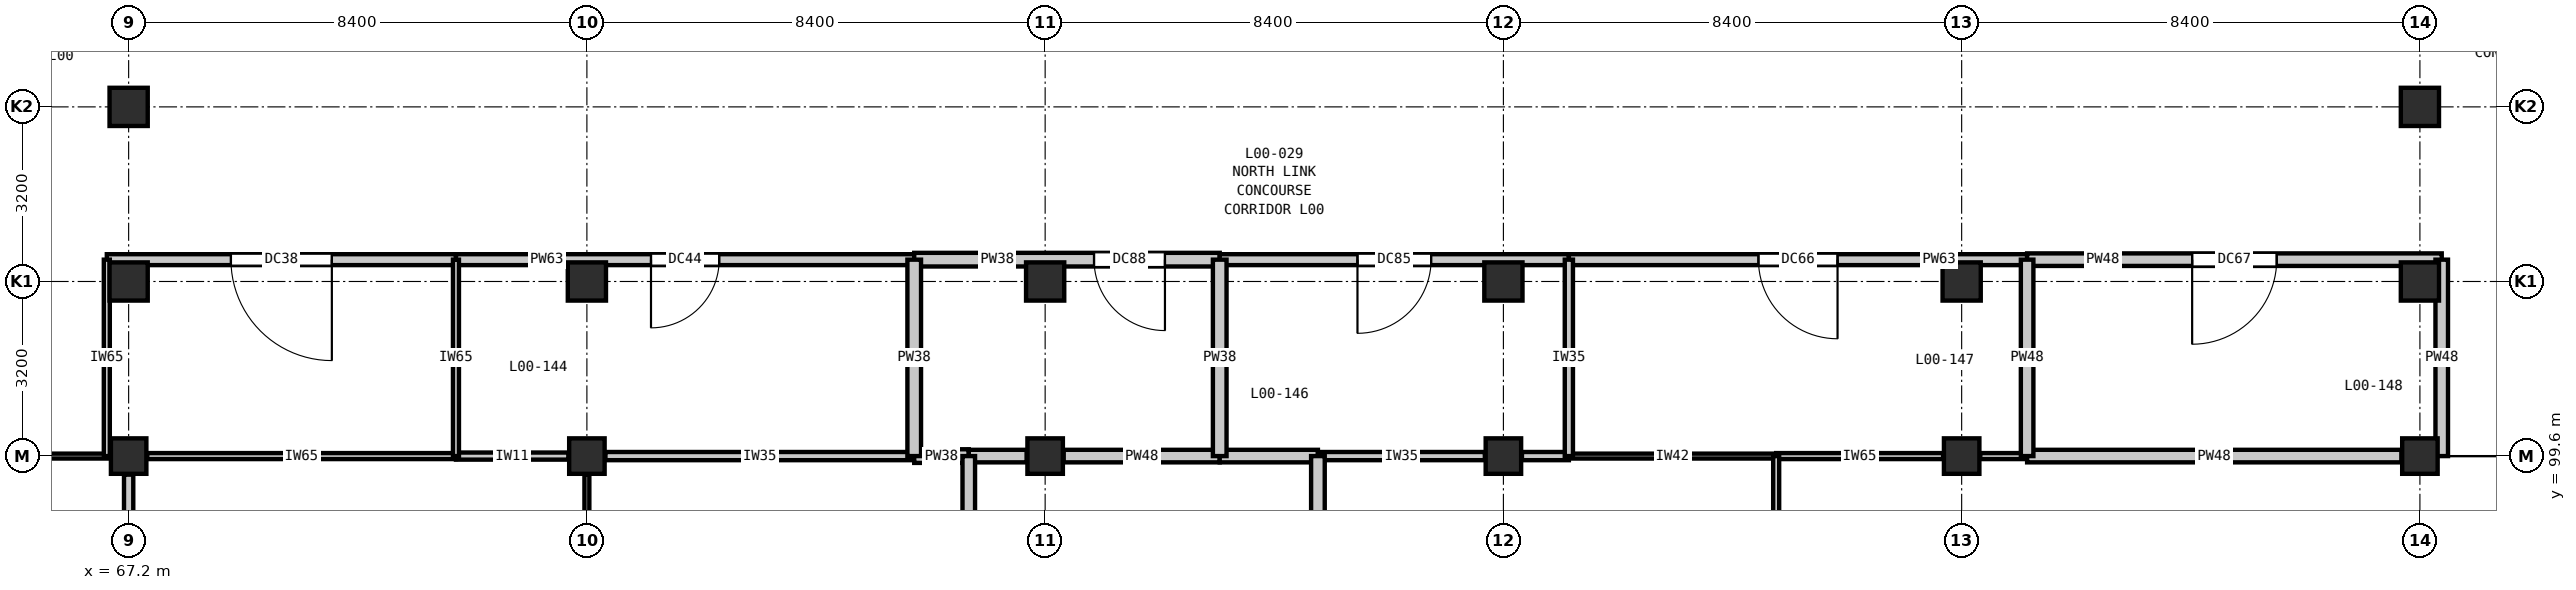
"""IFC4 building model, lengths in metres.
Left out: names, types, materials, properties, quantities, classifications, styles, units other than length and angle.
Written with IfcOpenShell. Run it as: python <this file> out.ifc"""

import sys

from ifc_helpers import new_model, si_unit, direction, frame, frame_2d, origin, origin_2d, place, context, subcontext, project, spatial, rectangle, extrude, element, fill, save


model = new_model("IFC4")
c1 = context("Model", 3, precision=1e-05, world=origin(), true_north=direction((0.0, 1.0)))
c2 = subcontext(c1, "Body", "Model", "MODEL_VIEW")
j1 = project(units=[si_unit("LENGTHUNIT", "METRE"), si_unit("PLANEANGLEUNIT", "RADIAN")], contexts=[c1])
p1 = place(None, origin())
s1 = spatial("IfcSite", under=j1, at=p1, CompositionType="ELEMENT")
p2 = place(p1, origin())
s2 = spatial("IfcBuilding", under=s1, at=p2, CompositionType="ELEMENT")
p3 = place(p2, origin())
s3 = spatial("IfcBuildingStorey", under=s2, at=p3, CompositionType="ELEMENT", Elevation=0.0)
p4 = place(p3, frame((67.2, 99.6, 0.0), z_axis=(0.0, 0.0, 1.0), x_axis=(1.0, 0.0, 0.0)))
e1 = element("IfcColumn", 1, at=p4, inside=s3, PredefinedType="COLUMN", context=c2, shape_type="SweptSolid", body=[
    extrude(rectangle(XDim=0.65, YDim=0.65, at=origin_2d()), origin(), (0.0, 0.0, 1.0), 5.4),
])
for number, where, z_axis, x_axis in (
    (2, (67.2, 102.8, 0.0), (0.0, 0.0, 1.0), (1.0, 0.0, 0.0)),
    (3, (67.2, 106.0, 0.0), (0.0, 0.0, 1.0), (1.0, 0.0, 0.0)),
):
    element("IfcColumn", number, at=place(p3, frame(where, z_axis=z_axis, x_axis=x_axis)), inside=s3, PredefinedType="COLUMN", context=c2, shape_type="SweptSolid", body=[
        extrude(rectangle(XDim=0.7, YDim=0.7, at=origin_2d()), origin(), (0.0, 0.0, 1.0), 5.4),
    ])
p5 = place(p3, frame((75.6, 99.6, 0.0), z_axis=(0.0, 0.0, 1.0), x_axis=(1.0, 0.0, 0.0)))
e4 = element("IfcColumn", 4, at=p5, inside=s3, PredefinedType="COLUMN", context=c2, shape_type="SweptSolid", body=[
    extrude(rectangle(XDim=0.65, YDim=0.65, at=origin_2d()), origin(), (0.0, 0.0, 1.0), 5.4),
])
p6 = place(p3, frame((75.6, 102.8, 0.0), z_axis=(0.0, 0.0, 1.0), x_axis=(1.0, 0.0, 0.0)))
e5 = element("IfcColumn", 5, at=p6, inside=s3, PredefinedType="COLUMN", context=c2, shape_type="SweptSolid", body=[
    extrude(rectangle(XDim=0.7, YDim=0.7, at=origin_2d()), origin(), (0.0, 0.0, 1.0), 5.4),
])
p7 = place(p3, frame((84.0, 99.6, 0.0), z_axis=(0.0, 0.0, 1.0), x_axis=(1.0, 0.0, 0.0)))
e6 = element("IfcColumn", 6, at=p7, inside=s3, PredefinedType="COLUMN", context=c2, shape_type="SweptSolid", body=[
    extrude(rectangle(XDim=0.65, YDim=0.65, at=origin_2d()), origin(), (0.0, 0.0, 1.0), 5.4),
])
p8 = place(p3, frame((84.0, 102.8, 0.0), z_axis=(0.0, 0.0, 1.0), x_axis=(1.0, 0.0, 0.0)))
e7 = element("IfcColumn", 7, at=p8, inside=s3, PredefinedType="COLUMN", context=c2, shape_type="SweptSolid", body=[
    extrude(rectangle(XDim=0.7, YDim=0.7, at=origin_2d()), origin(), (0.0, 0.0, 1.0), 5.4),
])
p9 = place(p3, frame((92.4, 99.6, 0.0), z_axis=(0.0, 0.0, 1.0), x_axis=(1.0, 0.0, 0.0)))
e8 = element("IfcColumn", 8, at=p9, inside=s3, PredefinedType="COLUMN", context=c2, shape_type="SweptSolid", body=[
    extrude(rectangle(XDim=0.65, YDim=0.65, at=origin_2d()), origin(), (0.0, 0.0, 1.0), 5.4),
])
p10 = place(p3, frame((92.4, 102.8, 0.0), z_axis=(0.0, 0.0, 1.0), x_axis=(1.0, 0.0, 0.0)))
e9 = element("IfcColumn", 9, at=p10, inside=s3, PredefinedType="COLUMN", context=c2, shape_type="SweptSolid", body=[
    extrude(rectangle(XDim=0.7, YDim=0.7, at=origin_2d()), origin(), (0.0, 0.0, 1.0), 5.4),
])
p11 = place(p3, frame((100.8, 99.6, 0.0), z_axis=(0.0, 0.0, 1.0), x_axis=(1.0, 0.0, 0.0)))
e10 = element("IfcColumn", 10, at=p11, inside=s3, PredefinedType="COLUMN", context=c2, shape_type="SweptSolid", body=[
    extrude(rectangle(XDim=0.65, YDim=0.65, at=origin_2d()), origin(), (0.0, 0.0, 1.0), 5.4),
])
p12 = place(p3, frame((100.8, 102.8, 0.0), z_axis=(0.0, 0.0, 1.0), x_axis=(1.0, 0.0, 0.0)))
e11 = element("IfcColumn", 11, at=p12, inside=s3, PredefinedType="COLUMN", context=c2, shape_type="SweptSolid", body=[
    extrude(rectangle(XDim=0.7, YDim=0.7, at=origin_2d()), origin(), (0.0, 0.0, 1.0), 5.4),
])
p13 = place(p3, frame((109.2, 99.6, 0.0), z_axis=(0.0, 0.0, 1.0), x_axis=(1.0, 0.0, 0.0)))
e12 = element("IfcColumn", 12, at=p13, inside=s3, PredefinedType="COLUMN", context=c2, shape_type="SweptSolid", body=[
    extrude(rectangle(XDim=0.65, YDim=0.65, at=origin_2d()), origin(), (0.0, 0.0, 1.0), 5.4),
])
for number, where, z_axis, x_axis in (
    (13, (109.2, 102.8, 0.0), (0.0, 0.0, 1.0), (1.0, 0.0, 0.0)),
    (14, (109.2, 106.0, 0.0), (0.0, 0.0, 1.0), (1.0, 0.0, 0.0)),
):
    element("IfcColumn", number, at=place(p3, frame(where, z_axis=z_axis, x_axis=x_axis)), inside=s3, PredefinedType="COLUMN", context=c2, shape_type="SweptSolid", body=[
        extrude(rectangle(XDim=0.7, YDim=0.7, at=origin_2d()), origin(), (0.0, 0.0, 1.0), 5.4),
    ])
p14 = place(p3, frame((63.6, 99.6, 0.0), z_axis=(0.0, 0.0, 1.0), x_axis=(1.0, 0.0, 0.0)))
e15 = element("IfcWall", 15, at=p14, inside=s3, PredefinedType="PARTITIONING", context=c2, shape_type="SweptSolid", body=[
    extrude(rectangle(XDim=3.2, YDim=0.09, at=frame_2d((1.6, 0.0))), origin(), (0.0, 0.0, 1.0), 4.635),
])
p15 = place(p3, frame((67.54, 99.6, 0.0), z_axis=(0.0, 0.0, 1.0), x_axis=(1.0, 0.0, 0.0)))
e16 = element("IfcWall", 16, at=p15, inside=s3, PredefinedType="PARTITIONING", context=c2, shape_type="SweptSolid", body=[
    extrude(rectangle(XDim=5.66, YDim=0.11, at=frame_2d((2.83, 0.0))), origin(), (0.0, 0.0, 1.0), 4.635),
])
p16 = place(p3, frame((73.2, 99.6, 0.0), z_axis=(0.0, 0.0, 1.0), x_axis=(1.0, 0.0, 0.0)))
e17 = element("IfcWall", 17, at=p16, inside=s3, PredefinedType="PARTITIONING", context=c2, shape_type="SweptSolid", body=[
    extrude(rectangle(XDim=2.06, YDim=0.13, at=frame_2d((1.03, 0.0))), origin(), (0.0, 0.0, 1.0), 4.635),
])
p17 = place(p3, frame((75.94, 99.6, 0.0), z_axis=(0.0, 0.0, 1.0), x_axis=(1.0, 0.0, 0.0)))
e18 = element("IfcWall", 18, at=p17, inside=s3, PredefinedType="PARTITIONING", context=c2, shape_type="SweptSolid", body=[
    extrude(rectangle(XDim=5.66, YDim=0.15, at=frame_2d((2.83, 0.0))), origin(), (0.0, 0.0, 1.0), 4.635),
])
p18 = place(p3, frame((81.6, 99.6, 0.0), z_axis=(0.0, 0.0, 1.0), x_axis=(1.0, 0.0, 0.0)))
e19 = element("IfcWall", 19, at=p18, inside=s3, PredefinedType="PARTITIONING", context=c2, shape_type="SweptSolid", body=[
    extrude(rectangle(XDim=1.0, YDim=0.25, at=frame_2d((0.5, 0.0))), origin(), (0.0, 0.0, 1.0), 4.635),
])
p19 = place(p3, frame((84.34, 99.6, 0.0), z_axis=(0.0, 0.0, 1.0), x_axis=(1.0, 0.0, 0.0)))
e20 = element("IfcWall", 20, at=p19, inside=s3, PredefinedType="PARTITIONING", context=c2, shape_type="SweptSolid", body=[
    extrude(rectangle(XDim=2.86, YDim=0.23, at=frame_2d((1.43, 0.0))), origin(), (0.0, 0.0, 1.0), 4.635),
])
p20 = place(p3, frame((82.6, 99.6, 0.0), z_axis=(0.0, 0.0, 1.0), x_axis=(1.0, 0.0, 0.0)))
e21 = element("IfcWall", 21, at=p20, inside=s3, PredefinedType="PARTITIONING", context=c2, shape_type="SweptSolid", body=[
    extrude(rectangle(XDim=1.06, YDim=0.23, at=frame_2d((0.53, 0.0))), origin(), (0.0, 0.0, 1.0), 4.635),
])
p21 = place(p3, frame((87.2, 99.6, 0.0), z_axis=(0.0, 0.0, 1.0), x_axis=(1.0, 0.0, 0.0)))
e22 = element("IfcWall", 22, at=p21, inside=s3, PredefinedType="PARTITIONING", context=c2, shape_type="SweptSolid", body=[
    extrude(rectangle(XDim=1.8, YDim=0.23, at=frame_2d((0.9, 0.0))), origin(), (0.0, 0.0, 1.0), 4.635),
])
p22 = place(p3, frame((89.0, 99.6, 0.0), z_axis=(0.0, 0.0, 1.0), x_axis=(1.0, 0.0, 0.0)))
e23 = element("IfcWall", 23, at=p22, inside=s3, PredefinedType="PARTITIONING", context=c2, shape_type="SweptSolid", body=[
    extrude(rectangle(XDim=3.06, YDim=0.15, at=frame_2d((1.53, 0.0))), origin(), (0.0, 0.0, 1.0), 4.635),
])
p23 = place(p3, frame((92.74, 99.6, 0.0), z_axis=(0.0, 0.0, 1.0), x_axis=(1.0, 0.0, 0.0)))
e24 = element("IfcWall", 24, at=p23, inside=s3, PredefinedType="PARTITIONING", context=c2, shape_type="SweptSolid", body=[
    extrude(rectangle(XDim=0.86, YDim=0.15, at=frame_2d((0.43, 0.0))), origin(), (0.0, 0.0, 1.0), 4.635),
])
p24 = place(p3, frame((93.6, 99.6, 0.0), z_axis=(0.0, 0.0, 1.0), x_axis=(1.0, 0.0, 0.0)))
e25 = element("IfcWall", 25, at=p24, inside=s3, PredefinedType="PARTITIONING", context=c2, shape_type="SweptSolid", body=[
    extrude(rectangle(XDim=3.8, YDim=0.09, at=frame_2d((1.9, 0.0))), origin(), (0.0, 0.0, 1.0), 4.635),
])
p25 = place(p3, frame((97.4, 99.6, 0.0), z_axis=(0.0, 0.0, 1.0), x_axis=(1.0, 0.0, 0.0)))
e26 = element("IfcWall", 26, at=p25, inside=s3, PredefinedType="PARTITIONING", context=c2, shape_type="SweptSolid", body=[
    extrude(rectangle(XDim=3.06, YDim=0.11, at=frame_2d((1.53, 0.0))), origin(), (0.0, 0.0, 1.0), 4.635),
])
p26 = place(p3, frame((101.14, 99.6, 0.0), z_axis=(0.0, 0.0, 1.0), x_axis=(1.0, 0.0, 0.0)))
e27 = element("IfcWall", 27, at=p26, inside=s3, PredefinedType="PARTITIONING", context=c2, shape_type="SweptSolid", body=[
    extrude(rectangle(XDim=0.86, YDim=0.11, at=frame_2d((0.43, 0.0))), origin(), (0.0, 0.0, 1.0), 4.635),
])
p27 = place(p3, frame((102.0, 99.6, 0.0), z_axis=(0.0, 0.0, 1.0), x_axis=(1.0, 0.0, 0.0)))
e28 = element("IfcWall", 28, at=p27, inside=s3, PredefinedType="PARTITIONING", context=c2, shape_type="SweptSolid", body=[
    extrude(rectangle(XDim=6.86, YDim=0.23, at=frame_2d((3.43, 0.0))), origin(), (0.0, 0.0, 1.0), 4.635),
])
p28 = place(p3, frame((66.8, 103.2, 0.0), z_axis=(0.0, 0.0, 1.0), x_axis=(1.0, 0.0, 0.0)))
e29 = element("IfcWall", 29, at=p28, inside=s3, PredefinedType="PARTITIONING", context=c2, shape_type="SweptSolid", body=[
    extrude(rectangle(XDim=6.4, YDim=0.2, at=frame_2d((3.2, 0.0))), origin(), (0.0, 0.0, 1.0), 5.04),
])
p29 = place(p28, frame((2.275, 0.0, 0.0)))
e30 = element("IfcOpeningElement", 30, at=p29, cuts=e29, PredefinedType="OPENING", context=c2, shape_type="SweptSolid", body=[
    extrude(rectangle(XDim=1.85, YDim=2.3, at=frame_2d((0.925, 1.15))), frame((0.0, 0.11, 0.0), z_axis=(0.0, -1.0, 0.0), x_axis=(1.0, 0.0, 0.0)), (0.0, 0.0, 1.0), 0.22),
])
p30 = place(p3, frame((73.2, 103.2, 0.0), z_axis=(0.0, 0.0, 1.0), x_axis=(1.0, 0.0, 0.0)))
e31 = element("IfcWall", 31, at=p30, inside=s3, PredefinedType="PARTITIONING", context=c2, shape_type="SweptSolid", body=[
    extrude(rectangle(XDim=8.4, YDim=0.2, at=frame_2d((4.2, 0.0))), origin(), (0.0, 0.0, 1.0), 5.04),
])
p31 = place(p30, frame((3.575, 0.0, 0.0)))
e32 = element("IfcOpeningElement", 32, at=p31, cuts=e31, PredefinedType="OPENING", context=c2, shape_type="SweptSolid", body=[
    extrude(rectangle(XDim=1.25, YDim=2.15, at=frame_2d((0.625, 1.075))), frame((0.0, 0.11, 0.0), z_axis=(0.0, -1.0, 0.0), x_axis=(1.0, 0.0, 0.0)), (0.0, 0.0, 1.0), 0.22),
])
p32 = place(p3, frame((81.6, 103.2, 0.0), z_axis=(0.0, 0.0, 1.0), x_axis=(1.0, 0.0, 0.0)))
e33 = element("IfcWall", 33, at=p32, inside=s3, PredefinedType="PARTITIONING", context=c2, shape_type="SweptSolid", body=[
    extrude(rectangle(XDim=5.6, YDim=0.25, at=frame_2d((2.8, 0.0))), origin(), (0.0, 0.0, 1.0), 5.04),
])
p33 = place(p32, frame((3.296, 0.0, 0.0)))
e34 = element("IfcOpeningElement", 34, at=p33, cuts=e33, PredefinedType="OPENING", context=c2, shape_type="SweptSolid", body=[
    extrude(rectangle(XDim=1.3, YDim=2.2, at=frame_2d((0.65, 1.1))), frame((0.0, 0.135, 0.0), z_axis=(0.0, -1.0, 0.0), x_axis=(1.0, 0.0, 0.0)), (0.0, 0.0, 1.0), 0.27),
])
p34 = place(p3, frame((87.2, 103.2, 0.0), z_axis=(0.0, 0.0, 1.0), x_axis=(1.0, 0.0, 0.0)))
e35 = element("IfcWall", 35, at=p34, inside=s3, PredefinedType="PARTITIONING", context=c2, shape_type="SweptSolid", body=[
    extrude(rectangle(XDim=6.4, YDim=0.2, at=frame_2d((3.2, 0.0))), origin(), (0.0, 0.0, 1.0), 5.04),
])
p35 = place(p34, frame((2.525, 0.0, 0.0)))
e36 = element("IfcOpeningElement", 36, at=p35, cuts=e35, PredefinedType="OPENING", context=c2, shape_type="SweptSolid", body=[
    extrude(rectangle(XDim=1.35, YDim=2.2, at=frame_2d((0.675, 1.1))), frame((0.0, 0.11, 0.0), z_axis=(0.0, -1.0, 0.0), x_axis=(1.0, 0.0, 0.0)), (0.0, 0.0, 1.0), 0.22),
])
p36 = place(p3, frame((93.6, 103.2, 0.0), z_axis=(0.0, 0.0, 1.0), x_axis=(1.0, 0.0, 0.0)))
e37 = element("IfcWall", 37, at=p36, inside=s3, PredefinedType="PARTITIONING", context=c2, shape_type="SweptSolid", body=[
    extrude(rectangle(XDim=8.4, YDim=0.2, at=frame_2d((4.2, 0.0))), origin(), (0.0, 0.0, 1.0), 5.04),
])
p37 = place(p36, frame((3.475, 0.0, 0.0)))
e38 = element("IfcOpeningElement", 38, at=p37, cuts=e37, PredefinedType="OPENING", context=c2, shape_type="SweptSolid", body=[
    extrude(rectangle(XDim=1.45, YDim=2.25, at=frame_2d((0.725, 1.125))), frame((0.0, 0.11, 0.0), z_axis=(0.0, -1.0, 0.0), x_axis=(1.0, 0.0, 0.0)), (0.0, 0.0, 1.0), 0.22),
])
p38 = place(p3, frame((102.0, 103.2, 0.0), z_axis=(0.0, 0.0, 1.0), x_axis=(1.0, 0.0, 0.0)))
e39 = element("IfcWall", 39, at=p38, inside=s3, PredefinedType="PARTITIONING", context=c2, shape_type="SweptSolid", body=[
    extrude(rectangle(XDim=7.6, YDim=0.23, at=frame_2d((3.8, 0.0))), origin(), (0.0, 0.0, 1.0), 5.04),
])
p39 = place(p38, frame((3.025, 0.0, 0.0)))
e40 = element("IfcOpeningElement", 40, at=p39, cuts=e39, PredefinedType="OPENING", context=c2, shape_type="SweptSolid", body=[
    extrude(rectangle(XDim=1.55, YDim=2.25, at=frame_2d((0.775, 1.125))), frame((0.0, 0.125, 0.0), z_axis=(0.0, -1.0, 0.0), x_axis=(1.0, 0.0, 0.0)), (0.0, 0.0, 1.0), 0.25),
])
p40 = place(p3, frame((66.8, 99.6, 0.0), z_axis=(0.0, 0.0, 1.0), x_axis=(0.0, 1.0, 0.0)))
e41 = element("IfcWall", 41, at=p40, inside=s3, PredefinedType="PARTITIONING", context=c2, shape_type="SweptSolid", body=[
    extrude(rectangle(XDim=3.6, YDim=0.11, at=frame_2d((1.8, 0.0))), origin(), (0.0, 0.0, 1.0), 5.04),
])
p41 = place(p3, frame((67.2, 91.54, 0.0), z_axis=(0.0, 0.0, 1.0), x_axis=(0.0, 1.0, 0.0)))
e42 = element("IfcWall", 42, at=p41, inside=s3, PredefinedType="PARTITIONING", context=c2, shape_type="SweptSolid", body=[
    extrude(rectangle(XDim=7.72, YDim=0.17, at=frame_2d((3.86, 0.0))), origin(), (0.0, 0.0, 1.0), 4.685),
])
p42 = place(p3, frame((73.2, 99.6, 0.0), z_axis=(0.0, 0.0, 1.0), x_axis=(0.0, 1.0, 0.0)))
e43 = element("IfcWall", 43, at=p42, inside=s3, PredefinedType="PARTITIONING", context=c2, shape_type="SweptSolid", body=[
    extrude(rectangle(XDim=3.6, YDim=0.11, at=frame_2d((1.8, 0.0))), origin(), (0.0, 0.0, 1.0), 5.04),
])
p43 = place(p3, frame((75.6, 91.54, 0.0), z_axis=(0.0, 0.0, 1.0), x_axis=(0.0, 1.0, 0.0)))
e44 = element("IfcWall", 44, at=p43, inside=s3, PredefinedType="PARTITIONING", context=c2, shape_type="SweptSolid", body=[
    extrude(rectangle(XDim=7.72, YDim=0.09, at=frame_2d((3.86, 0.0))), origin(), (0.0, 0.0, 1.0), 4.685),
])
p44 = place(p3, frame((81.6, 99.6, 0.0), z_axis=(0.0, 0.0, 1.0), x_axis=(0.0, 1.0, 0.0)))
e45 = element("IfcWall", 45, at=p44, inside=s3, PredefinedType="PARTITIONING", context=c2, shape_type="SweptSolid", body=[
    extrude(rectangle(XDim=3.6, YDim=0.25, at=frame_2d((1.8, 0.0))), origin(), (0.0, 0.0, 1.0), 5.04),
])
p45 = place(p3, frame((82.6, 88.6, 0.0), z_axis=(0.0, 0.0, 1.0), x_axis=(0.0, 1.0, 0.0)))
e46 = element("IfcWall", 46, at=p45, inside=s3, PredefinedType="PARTITIONING", context=c2, shape_type="SweptSolid", body=[
    extrude(rectangle(XDim=11.0, YDim=0.23, at=frame_2d((5.5, 0.0))), origin(), (0.0, 0.0, 1.0), 5.04),
])
p46 = place(p3, frame((87.2, 99.6, 0.0), z_axis=(0.0, 0.0, 1.0), x_axis=(0.0, 1.0, 0.0)))
e47 = element("IfcWall", 47, at=p46, inside=s3, PredefinedType="PARTITIONING", context=c2, shape_type="SweptSolid", body=[
    extrude(rectangle(XDim=3.6, YDim=0.25, at=frame_2d((1.8, 0.0))), origin(), (0.0, 0.0, 1.0), 5.04),
])
p47 = place(p3, frame((89.0, 88.6, 0.0), z_axis=(0.0, 0.0, 1.0), x_axis=(0.0, 1.0, 0.0)))
e48 = element("IfcWall", 48, at=p47, inside=s3, PredefinedType="PARTITIONING", context=c2, shape_type="SweptSolid", body=[
    extrude(rectangle(XDim=11.0, YDim=0.25, at=frame_2d((5.5, 0.0))), origin(), (0.0, 0.0, 1.0), 5.04),
])
p48 = place(p3, frame((93.6, 99.6, 0.0), z_axis=(0.0, 0.0, 1.0), x_axis=(0.0, 1.0, 0.0)))
e49 = element("IfcWall", 49, at=p48, inside=s3, PredefinedType="PARTITIONING", context=c2, shape_type="SweptSolid", body=[
    extrude(rectangle(XDim=3.6, YDim=0.15, at=frame_2d((1.8, 0.0))), origin(), (0.0, 0.0, 1.0), 5.04),
])
p49 = place(p3, frame((97.4, 88.6, 0.0), z_axis=(0.0, 0.0, 1.0), x_axis=(0.0, 1.0, 0.0)))
e50 = element("IfcWall", 50, at=p49, inside=s3, PredefinedType="PARTITIONING", context=c2, shape_type="SweptSolid", body=[
    extrude(rectangle(XDim=11.0, YDim=0.11, at=frame_2d((5.5, 0.0))), origin(), (0.0, 0.0, 1.0), 5.04),
])
for number, where, z_axis, x_axis in (
    (51, (102.0, 99.6, 0.0), (0.0, 0.0, 1.0), (0.0, 1.0, 0.0)),
    (52, (109.6, 99.6, 0.0), (0.0, 0.0, 1.0), (0.0, 1.0, 0.0)),
):
    element("IfcWall", number, at=place(p3, frame(where, z_axis=z_axis, x_axis=x_axis)), inside=s3, PredefinedType="PARTITIONING", context=c2, shape_type="SweptSolid", body=[
        extrude(rectangle(XDim=3.6, YDim=0.23, at=frame_2d((1.8, 0.0))), origin(), (0.0, 0.0, 1.0), 5.04),
    ])
p50 = place(p29, frame((1.85, 0.0, 0.0), z_axis=(0.0, 0.0, 1.0), x_axis=(-1.0, 0.0, 0.0)))
e53 = element("IfcDoor", 53, at=p50, inside=s3, OperationType="SINGLE_SWING_LEFT", PredefinedType="DOOR", context=c2, shape_type="SweptSolid", body=[
    extrude(rectangle(XDim=1.85, YDim=2.3, at=frame_2d((0.925, 1.15))), frame((0.0, 0.025, 0.0), z_axis=(0.0, -1.0, 0.0), x_axis=(1.0, 0.0, 0.0)), (0.0, 0.0, 1.0), 0.05),
])
fill(e30, e53)
p51 = place(p31, frame((1.25, 0.0, 0.0), z_axis=(0.0, 0.0, 1.0), x_axis=(-1.0, 0.0, 0.0)))
e54 = element("IfcDoor", 54, at=p51, inside=s3, OperationType="SINGLE_SWING_RIGHT", PredefinedType="DOOR", context=c2, shape_type="SweptSolid", body=[
    extrude(rectangle(XDim=1.25, YDim=2.15, at=frame_2d((0.625, 1.075))), frame((0.0, 0.025, 0.0), z_axis=(0.0, -1.0, 0.0), x_axis=(1.0, 0.0, 0.0)), (0.0, 0.0, 1.0), 0.05),
])
fill(e32, e54)
p52 = place(p33, frame((1.3, 0.0, 0.0), z_axis=(0.0, 0.0, 1.0), x_axis=(-1.0, 0.0, 0.0)))
e55 = element("IfcDoor", 55, at=p52, inside=s3, OperationType="SINGLE_SWING_LEFT", PredefinedType="DOOR", context=c2, shape_type="SweptSolid", body=[
    extrude(rectangle(XDim=1.3, YDim=2.2, at=frame_2d((0.65, 1.1))), frame((0.0, 0.025, 0.0), z_axis=(0.0, -1.0, 0.0), x_axis=(1.0, 0.0, 0.0)), (0.0, 0.0, 1.0), 0.05),
])
fill(e34, e55)
p53 = place(p35, frame((1.35, 0.0, 0.0), z_axis=(0.0, 0.0, 1.0), x_axis=(-1.0, 0.0, 0.0)))
e56 = element("IfcDoor", 56, at=p53, inside=s3, OperationType="SINGLE_SWING_RIGHT", PredefinedType="DOOR", context=c2, shape_type="SweptSolid", body=[
    extrude(rectangle(XDim=1.35, YDim=2.2, at=frame_2d((0.675, 1.1))), frame((0.0, 0.025, 0.0), z_axis=(0.0, -1.0, 0.0), x_axis=(1.0, 0.0, 0.0)), (0.0, 0.0, 1.0), 0.05),
])
fill(e36, e56)
p54 = place(p37, frame((1.45, 0.0, 0.0), z_axis=(0.0, 0.0, 1.0), x_axis=(-1.0, 0.0, 0.0)))
e57 = element("IfcDoor", 57, at=p54, inside=s3, OperationType="SINGLE_SWING_LEFT", PredefinedType="DOOR", context=c2, shape_type="SweptSolid", body=[
    extrude(rectangle(XDim=1.45, YDim=2.25, at=frame_2d((0.725, 1.125))), frame((0.0, 0.025, 0.0), z_axis=(0.0, -1.0, 0.0), x_axis=(1.0, 0.0, 0.0)), (0.0, 0.0, 1.0), 0.05),
])
fill(e38, e57)
p55 = place(p39, frame((1.55, 0.0, 0.0), z_axis=(0.0, 0.0, 1.0), x_axis=(-1.0, 0.0, 0.0)))
e58 = element("IfcDoor", 58, at=p55, inside=s3, OperationType="SINGLE_SWING_RIGHT", PredefinedType="DOOR", context=c2, shape_type="SweptSolid", body=[
    extrude(rectangle(XDim=1.55, YDim=2.25, at=frame_2d((0.775, 1.125))), frame((0.0, 0.025, 0.0), z_axis=(0.0, -1.0, 0.0), x_axis=(1.0, 0.0, 0.0)), (0.0, 0.0, 1.0), 0.05),
])
fill(e40, e58)
save(model, sys.argv[1])
